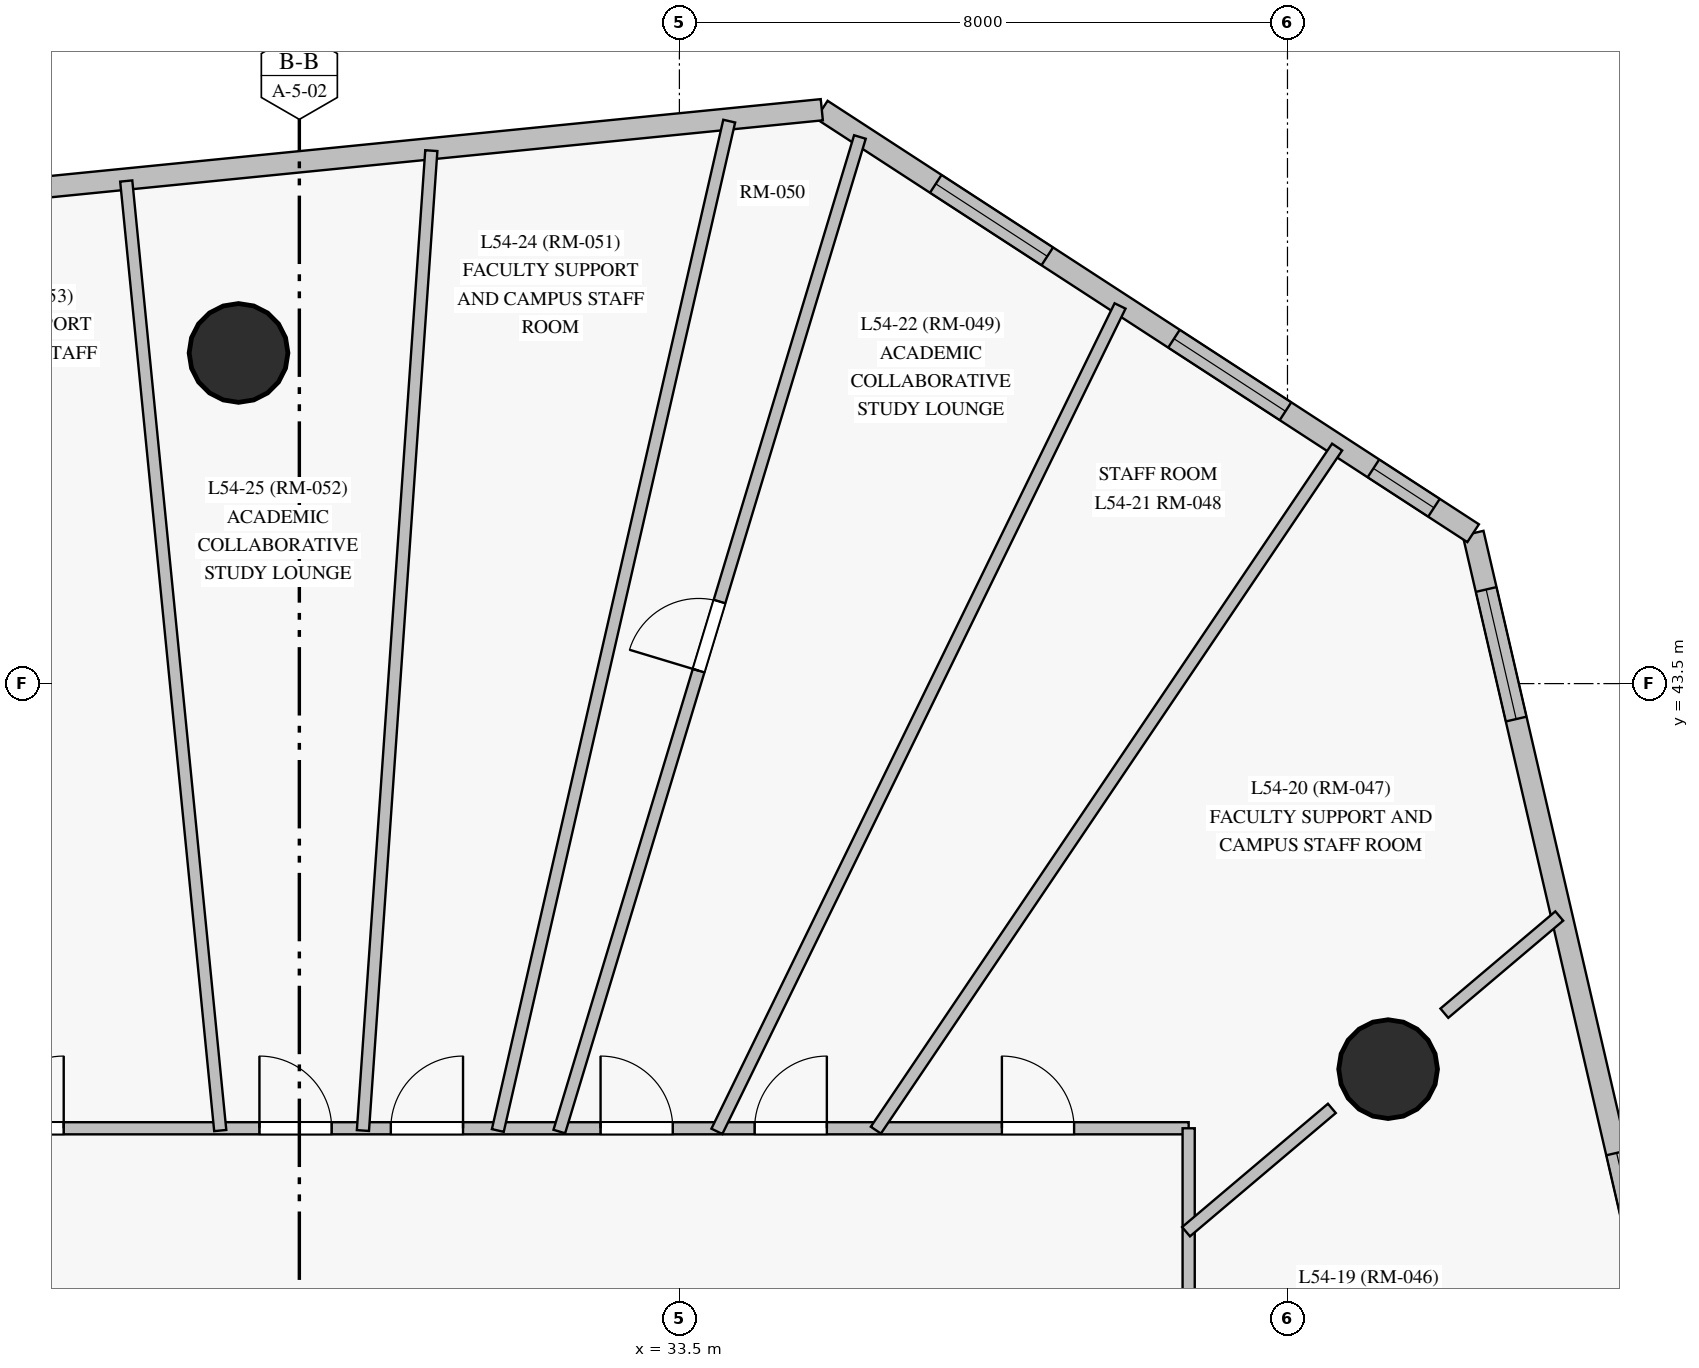
"""IFC4 building model, lengths in metres.
Left out: names, types, materials, properties, quantities, classifications, styles, units other than length and angle.
Written with IfcOpenShell. Run it as: python <this file> out.ifc"""

import sys

from ifc_helpers import new_model, si_unit, direction, frame, frame_2d, origin, origin_with_axes, origin_2d, place, context, subcontext, project, spatial, rectangle, circle, extrude, source, transform, mapped, element, fill, save


model = new_model("IFC4")
c1 = context("Model", 3, precision=1e-05, world=origin(), true_north=direction((0.0, 1.0)))
c2 = subcontext(c1, "Body", "Model", "MODEL_VIEW")
j1 = project(units=[si_unit("LENGTHUNIT", "METRE"), si_unit("PLANEANGLEUNIT", "RADIAN")], contexts=[c1])
p1 = place(None, origin())
s1 = spatial("IfcSite", under=j1, at=p1, CompositionType="ELEMENT")
p2 = place(p1, origin())
s2 = spatial("IfcBuilding", under=s1, at=p2, CompositionType="ELEMENT")
p3 = place(p2, frame((0.0, 0.0, 187.05)))
s3 = spatial("IfcBuildingStorey", under=s2, at=p3, CompositionType="ELEMENT", Elevation=187.05)
m1 = source(origin_with_axes(), c2, "Body", "SweptSolid", [
    extrude(circle(Radius=0.65, at=origin_2d()), origin(), (0.0, 0.0, 1.0), 3.05),
])
for number, where, z_axis, x_axis in (
    (1, (42.824, 38.428, 0.0), (0.0, 0.0, 1.0), (1.0, 0.0, 0.0)),
    (2, (27.7, 47.85, 0.0), (0.0, 0.0, 1.0), (1.0, 0.0, 0.0)),
):
    element("IfcColumn", number, at=place(p3, frame(where, z_axis=z_axis, x_axis=x_axis)), inside=s3, PredefinedType="COLUMN", context=c2, shape_type="MappedRepresentation", body=[
        mapped(m1, transform((0.0, 0.0, 0.0), scale=1.0)),
    ])
p4 = place(p3, frame((47.185, 31.474, 0.0), z_axis=(0.0, 0.0, 1.0), x_axis=(-0.225598723883, 0.974220311727, 0.0)))
e3 = element("IfcWall", 3, at=p4, inside=s3, PredefinedType="SOLIDWALL", context=c2, shape_type="SweptSolid", body=[
    extrude(rectangle(XDim=14.375, YDim=0.28, at=frame_2d((7.188, 0.0))), origin(), (0.0, 0.0, 1.0), 2.825),
])
p5 = place(p4, frame((0.677, 0.0, 0.85)))
e4 = element("IfcOpeningElement", 4, at=p5, cuts=e3, PredefinedType="OPENING", context=c2, shape_type="SweptSolid", body=[
    extrude(rectangle(XDim=1.75, YDim=1.65, at=frame_2d((0.875, 0.825))), frame((0.0, 0.15, 0.0), z_axis=(0.0, -1.0, 0.0), x_axis=(1.0, 0.0, 0.0)), (0.0, 0.0, 1.0), 0.3),
])
p6 = place(p4, frame((4.256, 0.0, 0.85)))
e5 = element("IfcOpeningElement", 5, at=p6, cuts=e3, PredefinedType="OPENING", context=c2, shape_type="SweptSolid", body=[
    extrude(rectangle(XDim=1.75, YDim=1.65, at=frame_2d((0.875, 0.825))), frame((0.0, 0.15, 0.0), z_axis=(0.0, -1.0, 0.0), x_axis=(1.0, 0.0, 0.0)), (0.0, 0.0, 1.0), 0.3),
])
p7 = place(p4, frame((11.865, 0.0, 0.85)))
e6 = element("IfcOpeningElement", 6, at=p7, cuts=e3, PredefinedType="OPENING", context=c2, shape_type="SweptSolid", body=[
    extrude(rectangle(XDim=1.75, YDim=1.65, at=frame_2d((0.875, 0.825))), frame((0.0, 0.15, 0.0), z_axis=(0.0, -1.0, 0.0), x_axis=(1.0, 0.0, 0.0)), (0.0, 0.0, 1.0), 0.3),
])
p8 = place(p3, frame((43.942, 45.479, 0.0), z_axis=(0.0, 0.0, 1.0), x_axis=(-0.838363930123, 0.545110925105, 0.0)))
e7 = element("IfcWall", 7, at=p8, inside=s3, PredefinedType="SOLIDWALL", context=c2, shape_type="SweptSolid", body=[
    extrude(rectangle(XDim=10.221, YDim=0.28, at=frame_2d((5.11, 0.0))), origin(), (0.0, 0.0, 1.0), 2.825),
])
p9 = place(p8, frame((0.614, 0.0, 0.85)))
e8 = element("IfcOpeningElement", 8, at=p9, cuts=e7, PredefinedType="OPENING", context=c2, shape_type="SweptSolid", body=[
    extrude(rectangle(XDim=0.95, YDim=1.5, at=frame_2d((0.475, 0.75))), frame((0.0, 0.15, 0.0), z_axis=(0.0, -1.0, 0.0), x_axis=(1.0, 0.0, 0.0)), (0.0, 0.0, 1.0), 0.3),
])
p10 = place(p8, frame((2.944, 0.0, 0.85)))
e9 = element("IfcOpeningElement", 9, at=p10, cuts=e7, PredefinedType="OPENING", context=c2, shape_type="SweptSolid", body=[
    extrude(rectangle(XDim=1.75, YDim=1.65, at=frame_2d((0.875, 0.825))), frame((0.0, 0.15, 0.0), z_axis=(0.0, -1.0, 0.0), x_axis=(1.0, 0.0, 0.0)), (0.0, 0.0, 1.0), 0.3),
])
p11 = place(p8, frame((6.682, 0.0, 0.85)))
e10 = element("IfcOpeningElement", 10, at=p11, cuts=e7, PredefinedType="OPENING", context=c2, shape_type="SweptSolid", body=[
    extrude(rectangle(XDim=1.75, YDim=1.65, at=frame_2d((0.875, 0.825))), frame((0.0, 0.15, 0.0), z_axis=(0.0, -1.0, 0.0), x_axis=(1.0, 0.0, 0.0)), (0.0, 0.0, 1.0), 0.3),
])
p12 = place(p3, frame((35.374, 51.05, 0.0), z_axis=(0.0, 0.0, 1.0), x_axis=(-0.995061275338, -0.099262572617, 0.0)))
e11 = element("IfcWall", 11, at=p12, inside=s3, PredefinedType="SOLIDWALL", context=c2, shape_type="SweptSolid", body=[
    extrude(rectangle(XDim=13.132, YDim=0.28, at=frame_2d((6.566, 0.0))), origin(), (0.0, 0.0, 1.0), 2.495),
])
p13 = place(p3, frame((16.7, 37.65, 0.0), z_axis=(0.0, 0.0, 1.0), x_axis=(1.0, 0.0, 0.0)))
e12 = element("IfcWall", 12, at=p13, inside=s3, PredefinedType="PARTITIONING", context=c2, shape_type="SweptSolid", body=[
    extrude(rectangle(XDim=23.5, YDim=0.16, at=frame_2d((11.75, 0.0))), origin(), (0.0, 0.0, 1.0), 2.375),
])
p14 = place(p13, frame((21.043, 0.0, 0.0)))
e13 = element("IfcOpeningElement", 13, at=p14, cuts=e12, PredefinedType="OPENING", context=c2, shape_type="SweptSolid", body=[
    extrude(rectangle(XDim=0.95, YDim=2.15, at=frame_2d((0.475, 1.075))), frame((0.0, 0.09, 0.0), z_axis=(0.0, -1.0, 0.0), x_axis=(1.0, 0.0, 0.0)), (0.0, 0.0, 1.0), 0.18),
])
p15 = place(p13, frame((17.79, 0.0, 0.0)))
e14 = element("IfcOpeningElement", 14, at=p15, cuts=e12, PredefinedType="OPENING", context=c2, shape_type="SweptSolid", body=[
    extrude(rectangle(XDim=0.95, YDim=2.15, at=frame_2d((0.475, 1.075))), frame((0.0, 0.09, 0.0), z_axis=(0.0, -1.0, 0.0), x_axis=(1.0, 0.0, 0.0)), (0.0, 0.0, 1.0), 0.18),
])
p16 = place(p13, frame((15.763, 0.0, 0.0)))
e15 = element("IfcOpeningElement", 15, at=p16, cuts=e12, PredefinedType="OPENING", context=c2, shape_type="SweptSolid", body=[
    extrude(rectangle(XDim=0.95, YDim=2.15, at=frame_2d((0.475, 1.075))), frame((0.0, 0.09, 0.0), z_axis=(0.0, -1.0, 0.0), x_axis=(1.0, 0.0, 0.0)), (0.0, 0.0, 1.0), 0.18),
])
p17 = place(p13, frame((13.003, 0.0, 0.0)))
e16 = element("IfcOpeningElement", 16, at=p17, cuts=e12, PredefinedType="OPENING", context=c2, shape_type="SweptSolid", body=[
    extrude(rectangle(XDim=0.95, YDim=2.15, at=frame_2d((0.475, 1.075))), frame((0.0, 0.09, 0.0), z_axis=(0.0, -1.0, 0.0), x_axis=(1.0, 0.0, 0.0)), (0.0, 0.0, 1.0), 0.18),
])
p18 = place(p13, frame((11.275, 0.0, 0.0)))
e17 = element("IfcOpeningElement", 17, at=p18, cuts=e12, PredefinedType="OPENING", context=c2, shape_type="SweptSolid", body=[
    extrude(rectangle(XDim=0.95, YDim=2.15, at=frame_2d((0.475, 1.075))), frame((0.0, 0.09, 0.0), z_axis=(0.0, -1.0, 0.0), x_axis=(1.0, 0.0, 0.0)), (0.0, 0.0, 1.0), 0.18),
])
p19 = place(p13, frame((7.75, 0.0, 0.0)))
e18 = element("IfcOpeningElement", 18, at=p19, cuts=e12, PredefinedType="OPENING", context=c2, shape_type="SweptSolid", body=[
    extrude(rectangle(XDim=0.95, YDim=2.15, at=frame_2d((0.475, 1.075))), frame((0.0, 0.09, 0.0), z_axis=(0.0, -1.0, 0.0), x_axis=(1.0, 0.0, 0.0)), (0.0, 0.0, 1.0), 0.18),
])
p20 = place(p13, frame((0.493, 0.0, 0.0)))
e19 = element("IfcOpeningElement", 19, at=p20, cuts=e12, PredefinedType="OPENING", context=c2, shape_type="SweptSolid", body=[
    extrude(rectangle(XDim=0.95, YDim=2.15, at=frame_2d((0.475, 1.075))), frame((0.0, 0.09, 0.0), z_axis=(0.0, -1.0, 0.0), x_axis=(1.0, 0.0, 0.0)), (0.0, 0.0, 1.0), 0.18),
])
p21 = place(p3, frame((40.2, 37.65, 0.0), z_axis=(0.0, 0.0, 1.0), x_axis=(0.0, -1.0, 0.0)))
e20 = element("IfcWall", 20, at=p21, inside=s3, PredefinedType="PARTITIONING", context=c2, shape_type="SweptSolid", body=[
    extrude(rectangle(XDim=22.3, YDim=0.16, at=frame_2d((11.15, 0.0))), origin(), (0.0, 0.0, 1.0), 2.375),
])
p22 = place(p21, frame((18.567, 0.0, 0.0)))
e21 = element("IfcOpeningElement", 21, at=p22, cuts=e20, PredefinedType="OPENING", context=c2, shape_type="SweptSolid", body=[
    extrude(rectangle(XDim=0.95, YDim=2.15, at=frame_2d((0.475, 1.075))), frame((0.0, 0.09, 0.0), z_axis=(0.0, -1.0, 0.0), x_axis=(1.0, 0.0, 0.0)), (0.0, 0.0, 1.0), 0.18),
])
p23 = place(p21, frame((11.165, 0.0, 0.0)))
e22 = element("IfcOpeningElement", 22, at=p23, cuts=e20, PredefinedType="OPENING", context=c2, shape_type="SweptSolid", body=[
    extrude(rectangle(XDim=0.95, YDim=2.15, at=frame_2d((0.475, 1.075))), frame((0.0, 0.09, 0.0), z_axis=(0.0, -1.0, 0.0), x_axis=(1.0, 0.0, 0.0)), (0.0, 0.0, 1.0), 0.18),
])
p24 = place(p21, frame((7.33, 0.0, 0.0)))
e23 = element("IfcOpeningElement", 23, at=p24, cuts=e20, PredefinedType="OPENING", context=c2, shape_type="SweptSolid", body=[
    extrude(rectangle(XDim=0.95, YDim=2.15, at=frame_2d((0.475, 1.075))), frame((0.0, 0.09, 0.0), z_axis=(0.0, -1.0, 0.0), x_axis=(1.0, 0.0, 0.0)), (0.0, 0.0, 1.0), 0.18),
])
p25 = place(p21, frame((4.66, 0.0, 0.0)))
e24 = element("IfcOpeningElement", 24, at=p25, cuts=e20, PredefinedType="OPENING", context=c2, shape_type="SweptSolid", body=[
    extrude(rectangle(XDim=0.95, YDim=2.15, at=frame_2d((0.475, 1.075))), frame((0.0, 0.09, 0.0), z_axis=(0.0, -1.0, 0.0), x_axis=(1.0, 0.0, 0.0)), (0.0, 0.0, 1.0), 0.18),
])
p26 = place(p3, frame((31.92, 37.607, 0.0), z_axis=(0.0, 0.0, 1.0), x_axis=(0.289331651379, 0.957228914894, 0.0)))
e25 = element("IfcWall", 25, at=p26, inside=s3, PredefinedType="PARTITIONING", context=c2, shape_type="SweptSolid", body=[
    extrude(rectangle(XDim=13.669, YDim=0.16, at=frame_2d((6.834, 0.0))), origin(), (0.0, 0.0, 1.0), 2.825),
])
p27 = place(p26, frame((6.334, 0.0, 0.0)))
e26 = element("IfcOpeningElement", 26, at=p27, cuts=e25, PredefinedType="OPENING", context=c2, shape_type="SweptSolid", body=[
    extrude(rectangle(XDim=0.95, YDim=2.15, at=frame_2d((0.475, 1.075))), frame((0.0, 0.09, 0.0), z_axis=(0.0, -1.0, 0.0), x_axis=(1.0, 0.0, 0.0)), (0.0, 0.0, 1.0), 0.18),
])
p28 = place(p3, frame((31.111, 37.621, 0.0), z_axis=(0.0, 0.0, 1.0), x_axis=(0.223468026285, 0.97471126044, 0.0)))
e27 = element("IfcWall", 27, at=p28, inside=s3, PredefinedType="PARTITIONING", context=c2, shape_type="SweptSolid", body=[
    extrude(rectangle(XDim=13.624, YDim=0.16, at=frame_2d((6.812, 0.0))), origin(), (0.0, 0.0, 1.0), 2.825),
])
p29 = place(p3, frame((29.336, 37.62, 0.0), z_axis=(0.0, 0.0, 1.0), x_axis=(0.069618375377, 0.997573697433, 0.0)))
e28 = element("IfcWall", 28, at=p29, inside=s3, PredefinedType="PARTITIONING", context=c2, shape_type="SweptSolid", body=[
    extrude(rectangle(XDim=12.923, YDim=0.16, at=frame_2d((6.461, 0.0))), origin(), (0.0, 0.0, 1.0), 2.825),
])
p30 = place(p3, frame((27.459, 37.62, 0.0), z_axis=(0.0, 0.0, 1.0), x_axis=(-0.098527382243, 0.995134340151, 0.0)))
e29 = element("IfcWall", 29, at=p30, inside=s3, PredefinedType="PARTITIONING", context=c2, shape_type="SweptSolid", body=[
    extrude(rectangle(XDim=12.553, YDim=0.16, at=frame_2d((6.276, 0.0))), origin(), (0.0, 0.0, 1.0), 2.275),
])
p31 = place(p3, frame((33.993, 37.61, 0.0), z_axis=(0.0, 0.0, 1.0), x_axis=(0.438887267055, 0.898542134135, 0.0)))
e30 = element("IfcWall", 30, at=p31, inside=s3, PredefinedType="PARTITIONING", context=c2, shape_type="SweptSolid", body=[
    extrude(rectangle(XDim=12.085, YDim=0.16, at=frame_2d((6.042, 0.0))), origin(), (0.0, 0.0, 1.0), 2.825),
])
p32 = place(p3, frame((36.085, 37.625, 0.0), z_axis=(0.0, 0.0, 1.0), x_axis=(0.559620939067, 0.828748698073, 0.0)))
e31 = element("IfcWall", 31, at=p32, inside=s3, PredefinedType="PARTITIONING", context=c2, shape_type="SweptSolid", body=[
    extrude(rectangle(XDim=10.844, YDim=0.16, at=frame_2d((5.422, 0.0))), origin(), (0.0, 0.0, 1.0), 2.825),
])
p33 = place(p3, frame((40.166, 36.289, 0.0), z_axis=(0.0, 0.0, 1.0), x_axis=(0.763533690392, 0.645767995209, 0.0)))
e32 = element("IfcWall", 32, at=p33, inside=s3, PredefinedType="PARTITIONING", context=c2, shape_type="SweptSolid", body=[
    extrude(rectangle(XDim=2.513, YDim=0.16, at=frame_2d((1.256, 0.0))), origin(), (0.0, 0.0, 1.0), 2.275),
])
p34 = place(p3, frame((43.564, 39.164, 0.0), z_axis=(0.0, 0.0, 1.0), x_axis=(0.76353126088, 0.645770867769, 0.0)))
e33 = element("IfcWall", 33, at=p34, inside=s3, PredefinedType="PARTITIONING", context=c2, shape_type="SweptSolid", body=[
    extrude(rectangle(XDim=1.98, YDim=0.16, at=frame_2d((0.99, 0.0))), origin(), (0.0, 0.0, 1.0), 2.495),
])
m2 = source(origin_with_axes(), c2, "Body", "SweptSolid", [
    extrude(rectangle(XDim=1.75, YDim=1.65, at=frame_2d((0.875, 0.825))), frame((0.0, 0.03, 0.0), z_axis=(0.0, -1.0, 0.0), x_axis=(1.0, 0.0, 0.0)), (0.0, 0.0, 1.0), 0.06),
])
p35 = place(p6, origin())
e34 = element("IfcWindow", 34, at=p35, inside=s3, PartitioningType="SINGLE_PANEL", PredefinedType="WINDOW", context=c2, shape_type="MappedRepresentation", body=[
    mapped(m2, transform((0.0, 0.0, 0.0), scale=1.0)),
])
fill(e5, e34)
p36 = place(p7, origin())
e35 = element("IfcWindow", 35, at=p36, inside=s3, PartitioningType="SINGLE_PANEL", PredefinedType="WINDOW", context=c2, shape_type="MappedRepresentation", body=[
    mapped(m2, transform((0.0, 0.0, 0.0), scale=1.0)),
])
fill(e6, e35)
m3 = source(origin_with_axes(), c2, "Body", "SweptSolid", [
    extrude(rectangle(XDim=0.95, YDim=1.5, at=frame_2d((0.475, 0.75))), frame((0.0, 0.03, 0.0), z_axis=(0.0, -1.0, 0.0), x_axis=(1.0, 0.0, 0.0)), (0.0, 0.0, 1.0), 0.06),
])
p37 = place(p9, origin())
e36 = element("IfcWindow", 36, at=p37, inside=s3, PartitioningType="SINGLE_PANEL", PredefinedType="WINDOW", context=c2, shape_type="MappedRepresentation", body=[
    mapped(m3, transform((0.0, 0.0, 0.0), scale=1.0)),
])
fill(e8, e36)
p38 = place(p10, origin())
e37 = element("IfcWindow", 37, at=p38, inside=s3, PartitioningType="SINGLE_PANEL", PredefinedType="WINDOW", context=c2, shape_type="MappedRepresentation", body=[
    mapped(m2, transform((0.0, 0.0, 0.0), scale=1.0)),
])
fill(e9, e37)
p39 = place(p11, origin())
e38 = element("IfcWindow", 38, at=p39, inside=s3, PartitioningType="SINGLE_PANEL", PredefinedType="WINDOW", context=c2, shape_type="MappedRepresentation", body=[
    mapped(m2, transform((0.0, 0.0, 0.0), scale=1.0)),
])
fill(e10, e38)
m4 = source(origin_with_axes(), c2, "Body", "SweptSolid", [
    extrude(rectangle(XDim=0.95, YDim=2.15, at=frame_2d((0.475, 1.075))), frame((0.0, 0.025, 0.0), z_axis=(0.0, -1.0, 0.0), x_axis=(1.0, 0.0, 0.0)), (0.0, 0.0, 1.0), 0.05),
])
p40 = place(p14, origin())
e39 = element("IfcDoor", 39, at=p40, inside=s3, OperationType="SINGLE_SWING_LEFT", PredefinedType="DOOR", context=c2, shape_type="MappedRepresentation", body=[
    mapped(m4, transform((0.0, 0.0, 0.0), scale=1.0)),
])
fill(e13, e39)
p41 = place(p15, origin())
e40 = element("IfcDoor", 40, at=p41, inside=s3, OperationType="SINGLE_SWING_RIGHT", PredefinedType="DOOR", context=c2, shape_type="MappedRepresentation", body=[
    mapped(m4, transform((0.0, 0.0, 0.0), scale=1.0)),
])
fill(e14, e40)
p42 = place(p16, origin())
e41 = element("IfcDoor", 41, at=p42, inside=s3, OperationType="SINGLE_SWING_LEFT", PredefinedType="DOOR", context=c2, shape_type="MappedRepresentation", body=[
    mapped(m4, transform((0.0, 0.0, 0.0), scale=1.0)),
])
fill(e15, e41)
p43 = place(p17, origin())
e42 = element("IfcDoor", 42, at=p43, inside=s3, OperationType="SINGLE_SWING_RIGHT", PredefinedType="DOOR", context=c2, shape_type="MappedRepresentation", body=[
    mapped(m4, transform((0.0, 0.0, 0.0), scale=1.0)),
])
fill(e16, e42)
p44 = place(p18, origin())
e43 = element("IfcDoor", 43, at=p44, inside=s3, OperationType="SINGLE_SWING_LEFT", PredefinedType="DOOR", context=c2, shape_type="MappedRepresentation", body=[
    mapped(m4, transform((0.0, 0.0, 0.0), scale=1.0)),
])
fill(e17, e43)
p45 = place(p19, origin())
e44 = element("IfcDoor", 44, at=p45, inside=s3, OperationType="SINGLE_SWING_RIGHT", PredefinedType="DOOR", context=c2, shape_type="MappedRepresentation", body=[
    mapped(m4, transform((0.0, 0.0, 0.0), scale=1.0)),
])
fill(e18, e44)
p46 = place(p27, origin())
e45 = element("IfcDoor", 45, at=p46, inside=s3, OperationType="SINGLE_SWING_LEFT", PredefinedType="DOOR", context=c2, shape_type="MappedRepresentation", body=[
    mapped(m4, transform((0.0, 0.0, 0.0), scale=1.0)),
])
fill(e26, e45)
save(model, sys.argv[1])
